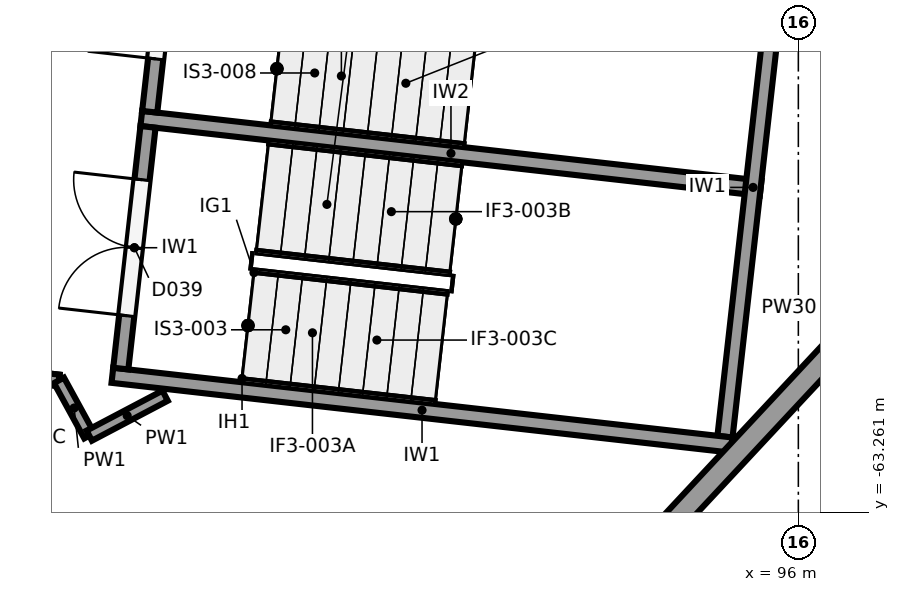
"""IFC4 building model, lengths in metres.
Left out: names, types, materials, properties, quantities, classifications, styles, units other than length and angle.
Written with IfcOpenShell. Run it as: python <this file> out.ifc"""

import sys

from ifc_helpers import new_model, si_unit, direction, frame, frame_2d, origin, place, context, subcontext, project, spatial, rectangle, extrude, element, fill, save


model = new_model("IFC4")
c1 = context("Model", 3, precision=1e-05, world=origin(), true_north=direction((0.0, 1.0)))
c2 = subcontext(c1, "Body", "Model", "MODEL_VIEW")
j1 = project(units=[si_unit("LENGTHUNIT", "METRE"), si_unit("PLANEANGLEUNIT", "RADIAN")], contexts=[c1])
p1 = place(None, origin())
s1 = spatial("IfcSite", under=j1, at=p1, CompositionType="ELEMENT")
p2 = place(p1, origin())
s2 = spatial("IfcBuilding", under=s1, at=p2, CompositionType="ELEMENT")
p3 = place(p2, frame((0.0, 0.0, 6.5)))
s3 = spatial("IfcBuildingStorey", under=s2, at=p3, CompositionType="ELEMENT", Elevation=6.5)
p4 = place(p3, frame((100.711, -56.568, 0.0), z_axis=(0.0, 0.0, 1.0), x_axis=(-0.681794658463, -0.731543603411, 0.0)))
e1 = element("IfcWall", 1, at=p4, inside=s3, PredefinedType="SOLIDWALL", context=c2, shape_type="SweptSolid", body=[
    extrude(rectangle(XDim=12.514, YDim=0.3, at=frame_2d((6.257, 0.0))), origin(), (0.0, 0.0, 1.0), 3.85),
])
p5 = place(p3, frame((95.123, -62.378, 0.0), z_axis=(0.0, 0.0, 1.0), x_axis=(-0.993710792168, 0.111977058046, 0.0)))
e2 = element("IfcWall", 2, at=p5, inside=s3, PredefinedType="SHEAR", context=c2, shape_type="SweptSolid", body=[
    extrude(rectangle(XDim=8.2, YDim=0.2, at=frame_2d((4.1, 0.0))), origin(), (0.0, 0.0, 1.0), 5.15),
])
p6 = place(p3, frame((95.035, -62.267, 0.0), z_axis=(0.0, 0.0, 1.0), x_axis=(0.111933579504, 0.993715690617, 0.0)))
e3 = element("IfcWall", 3, at=p6, inside=s3, PredefinedType="SHEAR", context=c2, shape_type="SweptSolid", body=[
    extrude(rectangle(XDim=6.6, YDim=0.2, at=frame_2d((3.3, 0.0))), origin(), (0.0, 0.0, 1.0), 5.15),
])
p7 = place(p3, frame((95.504, -58.999, 0.0), z_axis=(0.0, 0.0, 1.0), x_axis=(-0.993710792168, 0.111977058046, 0.0)))
e4 = element("IfcWall", 4, at=p7, inside=s3, PredefinedType="SHEAR", context=c2, shape_type="SweptSolid", body=[
    extrude(rectangle(XDim=8.2, YDim=0.2, at=frame_2d((4.1, 0.0))), origin(), (0.0, 0.0, 1.0), 5.15),
])
p8 = place(p3, frame((87.085, -61.372, 0.0), z_axis=(0.0, 0.0, 1.0), x_axis=(0.11192190762, 0.993717005286, 0.0)))
e5 = element("IfcWall", 5, at=p8, inside=s3, PredefinedType="SHEAR", context=c2, shape_type="SweptSolid", body=[
    extrude(rectangle(XDim=3.2, YDim=0.2, at=frame_2d((1.6, 0.0))), origin(), (0.0, 0.0, 1.0), 5.15),
])
p9 = place(p8, frame((0.7, 0.0, 0.0)))
e6 = element("IfcOpeningElement", 6, at=p9, cuts=e5, PredefinedType="OPENING", context=c2, shape_type="SweptSolid", body=[
    extrude(rectangle(XDim=1.8, YDim=2.1, at=frame_2d((0.9, 1.05))), frame((0.0, 0.11, 0.0), z_axis=(0.0, -1.0, 0.0), x_axis=(1.0, 0.0, 0.0)), (0.0, 0.0, 1.0), 0.22),
])
p10 = place(p3, frame((87.466, -57.993, 0.0), z_axis=(0.0, 0.0, 1.0), x_axis=(0.111997244021, 0.993708517288, 0.0)))
e7 = element("IfcWall", 7, at=p10, inside=s3, PredefinedType="SHEAR", context=c2, shape_type="SweptSolid", body=[
    extrude(rectangle(XDim=3.2, YDim=0.2, at=frame_2d((1.6, 0.0))), origin(), (0.0, 0.0, 1.0), 5.15),
])
p11 = place(p10, frame((0.7, 0.0, 0.0)))
e8 = element("IfcOpeningElement", 8, at=p11, cuts=e7, PredefinedType="OPENING", context=c2, shape_type="SweptSolid", body=[
    extrude(rectangle(XDim=1.8, YDim=2.1, at=frame_2d((0.9, 1.05))), frame((0.0, 0.11, 0.0), z_axis=(0.0, -1.0, 0.0), x_axis=(1.0, 0.0, 0.0)), (0.0, 0.0, 1.0), 0.22),
])
p12 = place(p3, frame((79.958, -60.815, 0.0), z_axis=(0.0, 0.0, 1.0), x_axis=(0.99370867388, -0.111995854638, 0.0)))
e9 = element("IfcWall", 9, at=p12, inside=s3, PredefinedType="PARTITIONING", context=c2, shape_type="SweptSolid", body=[
    extrude(rectangle(XDim=6.354, YDim=0.15, at=frame_2d((3.177, 0.0))), origin(), (0.0, 0.0, 1.0), 4.05),
])
p13 = place(p12, frame((3.85, 0.0, 0.0)))
e10 = element("IfcOpeningElement", 10, at=p13, cuts=e9, PredefinedType="OPENING", context=c2, shape_type="SweptSolid", body=[
    extrude(rectangle(XDim=1.8, YDim=2.1, at=frame_2d((0.9, 1.05))), frame((0.0, 0.085, 0.0), z_axis=(0.0, -1.0, 0.0), x_axis=(1.0, 0.0, 0.0)), (0.0, 0.0, 1.0), 0.17),
])
p14 = place(p3, frame((85.622, -61.453, 4.05), z_axis=(0.0, 0.0, 1.0), x_axis=(0.993672626597, -0.11231523117, 0.0)))
e11 = element("IfcWall", 11, at=p14, inside=s3, PredefinedType="PARTITIONING", context=c2, shape_type="SweptSolid", body=[
    extrude(rectangle(XDim=0.654, YDim=0.15, at=frame_2d((0.327, 0.0))), origin(), (0.0, 0.0, 1.0), 1.1),
])
p15 = place(p3, frame((86.272, -61.527, 0.0), z_axis=(0.0, 0.0, 1.0), x_axis=(0.480336186773, -0.877084458691, 0.0)))
e12 = element("IfcWall", 12, at=p15, inside=s3, PredefinedType="PARTITIONING", context=c2, shape_type="SweptSolid", body=[
    extrude(rectangle(XDim=0.83, YDim=0.15, at=frame_2d((0.415, 0.0))), origin(), (0.0, 0.0, 1.0), 5.15),
])
p16 = place(p3, frame((86.67, -62.254, 0.0), z_axis=(0.0, 0.0, 1.0), x_axis=(0.884880656279, 0.465817801446, 0.0)))
e13 = element("IfcWall", 13, at=p16, inside=s3, PredefinedType="PARTITIONING", context=c2, shape_type="SweptSolid", body=[
    extrude(rectangle(XDim=1.128, YDim=0.15, at=frame_2d((0.564, 0.0))), origin(), (0.0, 0.0, 1.0), 5.15),
])
p17 = place(p9, origin())
e14 = element("IfcDoor", 14, at=p17, inside=s3, OperationType="DOUBLE_DOOR_SINGLE_SWING", PredefinedType="DOOR", context=c2, shape_type="SweptSolid", body=[
    extrude(rectangle(XDim=1.8, YDim=2.1, at=frame_2d((0.9, 1.05))), frame((0.0, 0.025, 0.0), z_axis=(0.0, -1.0, 0.0), x_axis=(1.0, 0.0, 0.0)), (0.0, 0.0, 1.0), 0.05),
])
fill(e6, e14)
p18 = place(p11, origin())
e15 = element("IfcDoor", 15, at=p18, inside=s3, OperationType="DOUBLE_DOOR_SINGLE_SWING", PredefinedType="DOOR", context=c2, shape_type="SweptSolid", body=[
    extrude(rectangle(XDim=1.8, YDim=2.1, at=frame_2d((0.9, 1.05))), frame((0.0, 0.025, 0.0), z_axis=(0.0, -1.0, 0.0), x_axis=(1.0, 0.0, 0.0)), (0.0, 0.0, 1.0), 0.05),
])
fill(e8, e15)
save(model, sys.argv[1])
